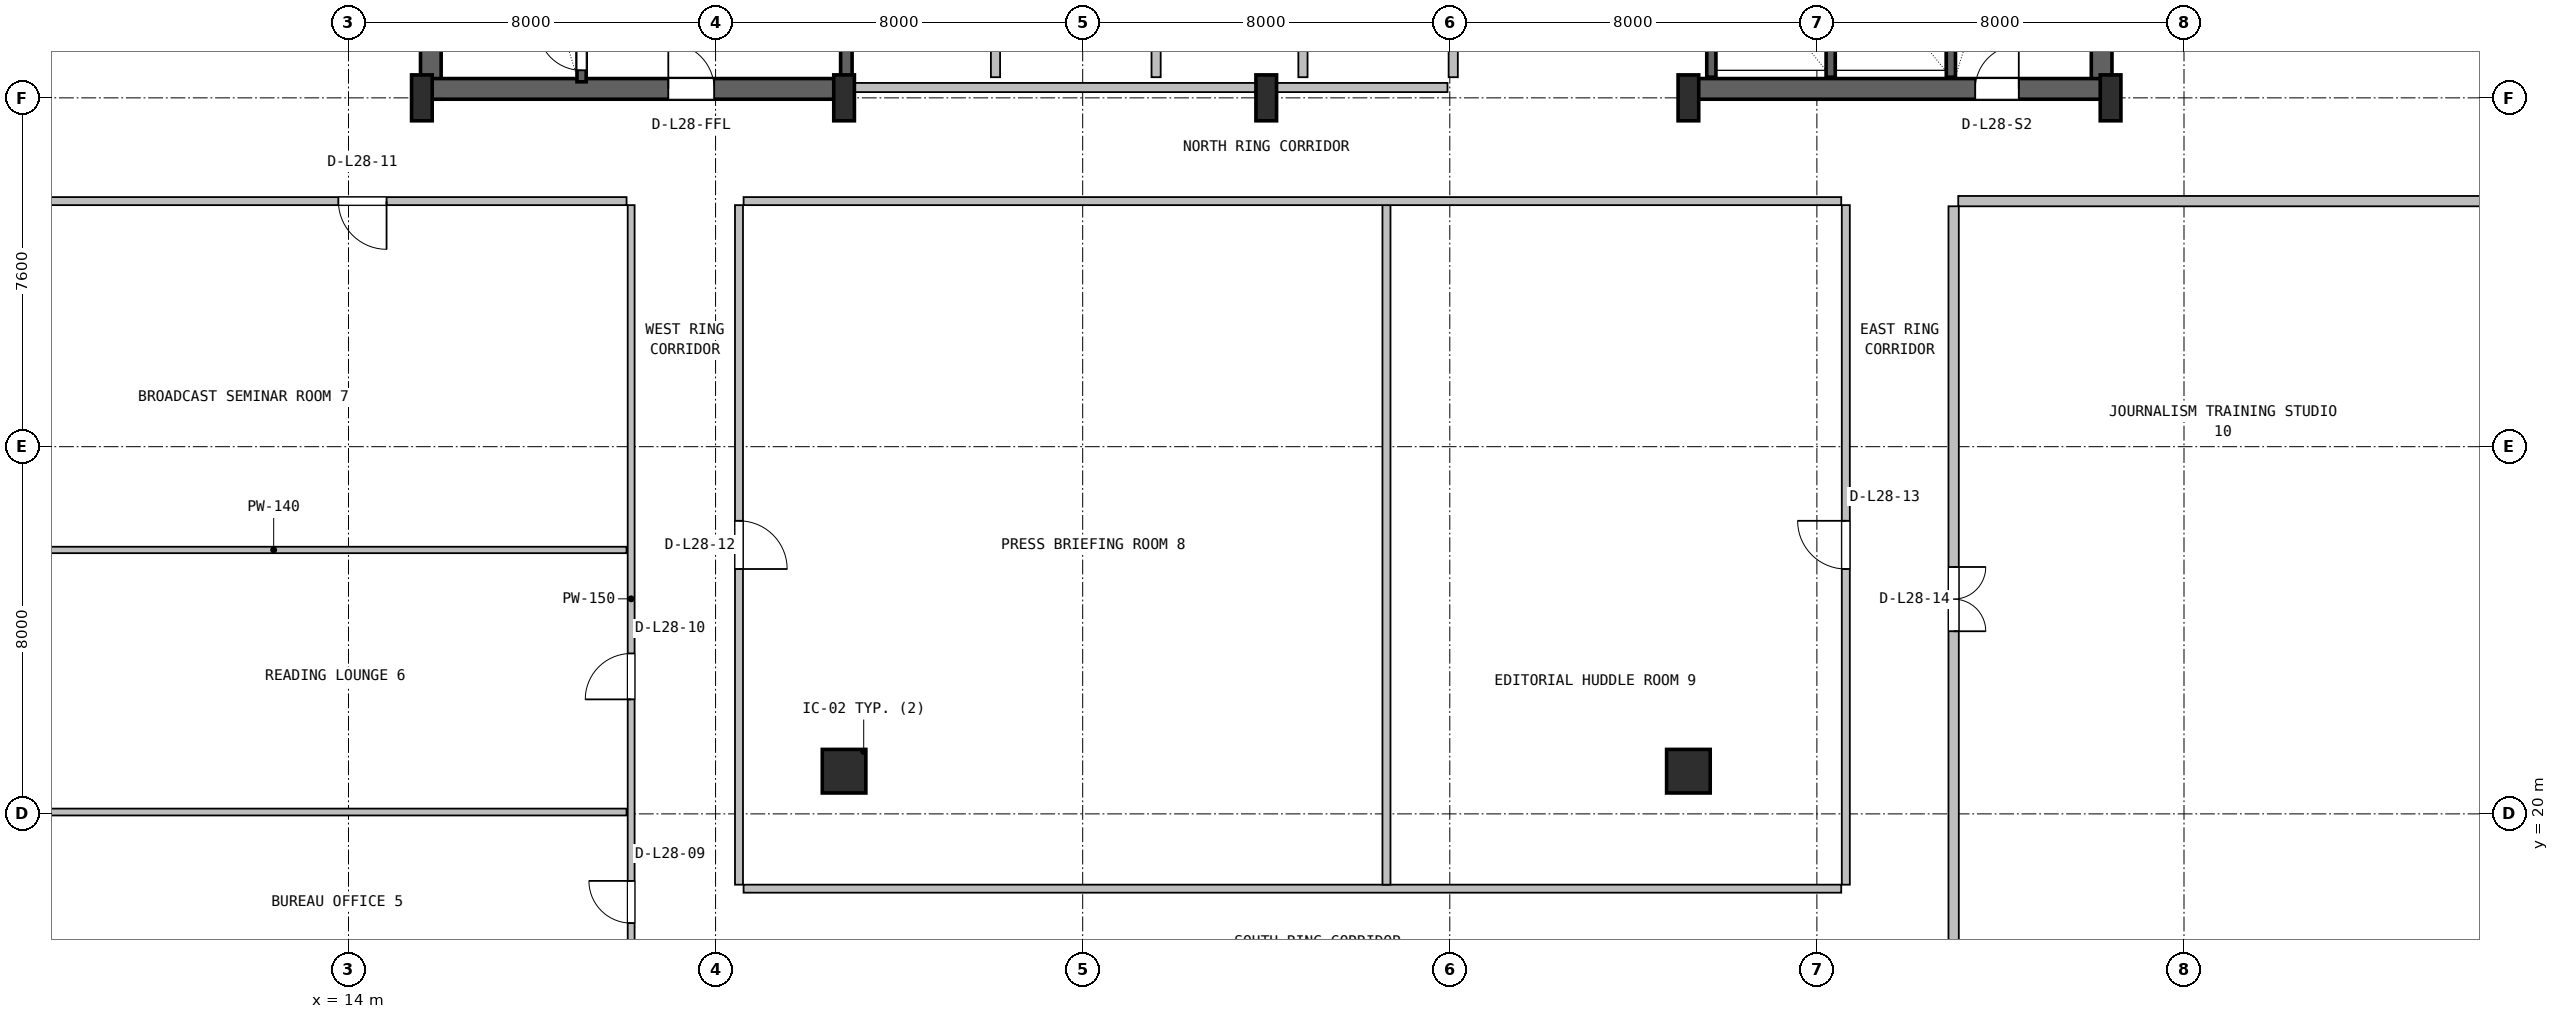
"""IFC4 building model, lengths in metres.
Left out: names, types, materials, properties, quantities, classifications, styles, units other than length and angle.
Written with IfcOpenShell. Run it as: python <this file> out.ifc"""

import sys

from ifc_helpers import new_model, si_unit, direction, frame, frame_2d, origin, origin_2d, place, context, subcontext, project, spatial, rectangle, i_section, extrude, source, transform, mapped, element, fill, save


model = new_model("IFC4")
c1 = context("Model", 3, precision=1e-05, world=origin(), true_north=direction((0.0, 1.0)))
c2 = subcontext(c1, "Body", "Model", "MODEL_VIEW")
j1 = project(units=[si_unit("LENGTHUNIT", "METRE"), si_unit("PLANEANGLEUNIT", "RADIAN")], contexts=[c1])
p1 = place(None, origin())
s1 = spatial("IfcSite", under=j1, at=p1, CompositionType="ELEMENT")
p2 = place(p1, origin())
s2 = spatial("IfcBuilding", under=s1, at=p2, CompositionType="ELEMENT")
p3 = place(p2, frame((0.0, 0.0, 118.2)))
s3 = spatial("IfcBuildingStorey", under=s2, at=p3, CompositionType="ELEMENT", Elevation=118.2)
for number, where, z_axis, x_axis in (
    (1, (15.795, 35.57, 0.0), (0.0, 0.0, 1.0), (0.0, 1.0, 0.0)),
    (2, (52.205, 35.57, 0.0), (0.0, 0.0, 1.0), (0.0, 1.0, 0.0)),
):
    element("IfcWall", number, at=place(p3, frame(where, z_axis=z_axis, x_axis=x_axis)), inside=s3, PredefinedType="SHEAR", context=c2, shape_type="SweptSolid", body=[
        extrude(rectangle(XDim=11.23, YDim=0.45, at=frame_2d((5.615, 0.0))), origin(), (0.0, 0.0, 1.0), 3.55),
    ])
p4 = place(p3, frame((15.57, 35.795, 0.0), z_axis=(0.0, 0.0, 1.0), x_axis=(1.0, 0.0, 0.0)))
e3 = element("IfcWall", 3, at=p4, inside=s3, PredefinedType="SHEAR", context=c2, shape_type="SweptSolid", body=[
    extrude(rectangle(XDim=9.23, YDim=0.45, at=frame_2d((4.615, 0.0))), origin(), (0.0, 0.0, 1.0), 3.55),
])
p5 = place(p4, frame((5.4, 0.0, 0.0)))
e4 = element("IfcOpeningElement", 4, at=p5, cuts=e3, PredefinedType="OPENING", context=c2, shape_type="SweptSolid", body=[
    extrude(rectangle(XDim=1.0, YDim=2.1, at=frame_2d((0.5, 1.05))), frame((0.0, 0.235, 0.0), z_axis=(0.0, -1.0, 0.0), x_axis=(1.0, 0.0, 0.0)), (0.0, 0.0, 1.0), 0.47),
])
p6 = place(p3, frame((43.2, 35.795, 0.0), z_axis=(0.0, 0.0, 1.0), x_axis=(1.0, 0.0, 0.0)))
e5 = element("IfcWall", 5, at=p6, inside=s3, PredefinedType="SHEAR", context=c2, shape_type="SweptSolid", body=[
    extrude(rectangle(XDim=9.23, YDim=0.45, at=frame_2d((4.615, 0.0))), origin(), (0.0, 0.0, 1.0), 3.55),
])
p7 = place(p6, frame((6.25, 0.0, 0.0)))
e6 = element("IfcOpeningElement", 6, at=p7, cuts=e5, PredefinedType="OPENING", context=c2, shape_type="SweptSolid", body=[
    extrude(rectangle(XDim=0.95, YDim=2.1, at=frame_2d((0.475, 1.05))), frame((0.0, 0.235, 0.0), z_axis=(0.0, -1.0, 0.0), x_axis=(1.0, 0.0, 0.0)), (0.0, 0.0, 1.0), 0.47),
])
m1 = source(origin(), c2, "Body", "SweptSolid", [
    extrude(i_section(OverallWidth=0.45, OverallDepth=1.0, WebThickness=0.016, FlangeThickness=0.03, FilletRadius=0.016, at=origin_2d()), origin(), (0.0, 0.0, 1.0), 3.8),
])
for number, where, z_axis, x_axis in (
    (7, (15.6, 35.6, 0.0), (0.0, 0.0, 1.0), (1.0, 0.0, 0.0)),
    (8, (24.8, 35.6, 0.0), (0.0, 0.0, 1.0), (1.0, 0.0, 0.0)),
    (9, (34.0, 35.6, 0.0), (0.0, 0.0, 1.0), (1.0, 0.0, 0.0)),
    (10, (43.2, 35.6, 0.0), (0.0, 0.0, 1.0), (1.0, 0.0, 0.0)),
    (11, (52.4, 35.6, 0.0), (0.0, 0.0, 1.0), (1.0, 0.0, 0.0)),
):
    element("IfcColumn", number, at=place(p3, frame(where, z_axis=z_axis, x_axis=x_axis)), inside=s3, PredefinedType="COLUMN", context=c2, shape_type="MappedRepresentation", body=[
        mapped(m1, transform((0.0, 0.0, 0.0), x_axis=(1.0, 0.0, 0.0), y_axis=(0.0, 1.0, 0.0), z_axis=(0.0, 0.0, 1.0), scale=1.0)),
    ])
m2 = source(origin(), c2, "Body", "SweptSolid", [
    extrude(rectangle(XDim=0.95, YDim=0.95, at=origin_2d()), origin(), (0.0, 0.0, 1.0), 3.8),
])
for number, where, z_axis, x_axis in (
    (12, (24.8, 20.93, 0.0), (0.0, 0.0, 1.0), (1.0, 0.0, 0.0)),
    (13, (43.2, 20.93, 0.0), (0.0, 0.0, 1.0), (1.0, 0.0, 0.0)),
):
    element("IfcColumn", number, at=place(p3, frame(where, z_axis=z_axis, x_axis=x_axis)), inside=s3, PredefinedType="COLUMN", context=c2, shape_type="MappedRepresentation", body=[
        mapped(m2, transform((0.0, 0.0, 0.0), x_axis=(1.0, 0.0, 0.0), y_axis=(0.0, 1.0, 0.0), z_axis=(0.0, 0.0, 1.0), scale=1.0)),
    ])
p8 = place(p3, frame((19.08, 35.95, 0.0), z_axis=(0.0, 0.0, 1.0), x_axis=(0.0, 1.0, 0.0)))
e14 = element("IfcWall", 14, at=p8, inside=s3, PredefinedType="SHEAR", context=c2, shape_type="SweptSolid", body=[
    extrude(rectangle(XDim=9.65, YDim=0.2, at=frame_2d((4.825, 0.0))), origin(), (0.0, 0.0, 1.0), 3.55),
])
p9 = place(p8, frame((0.25, 0.0, 0.0)))
e15 = element("IfcOpeningElement", 15, at=p9, cuts=e14, PredefinedType="OPENING", context=c2, shape_type="SweptSolid", body=[
    extrude(rectangle(XDim=0.95, YDim=2.1, at=frame_2d((0.475, 1.05))), frame((0.0, 0.11, 0.0), z_axis=(0.0, -1.0, 0.0), x_axis=(1.0, 0.0, 0.0)), (0.0, 0.0, 1.0), 0.22),
])
p10 = place(p3, frame((24.85, 36.05, 0.0), z_axis=(0.0, 0.0, 1.0), x_axis=(0.0, 1.0, 0.0)))
e16 = element("IfcWall", 16, at=p10, inside=s3, PredefinedType="SHEAR", context=c2, shape_type="SweptSolid", body=[
    extrude(rectangle(XDim=10.45, YDim=0.25, at=frame_2d((5.225, 0.0))), origin(), (0.0, 0.0, 1.0), 3.55),
])
p11 = place(p3, frame((48.92, 36.05, 0.0), z_axis=(0.0, 0.0, 1.0), x_axis=(0.0, 1.0, 0.0)))
e17 = element("IfcWall", 17, at=p11, inside=s3, PredefinedType="SHEAR", context=c2, shape_type="SweptSolid", body=[
    extrude(rectangle(XDim=10.5, YDim=0.2, at=frame_2d((5.25, 0.0))), origin(), (0.0, 0.0, 1.0), 3.55),
])
for number, where, z_axis, x_axis in (
    (18, (43.7, 36.05, 0.0), (0.0, 0.0, 1.0), (0.0, 1.0, 0.0)),
    (19, (46.3, 36.05, 0.0), (0.0, 0.0, 1.0), (0.0, 1.0, 0.0)),
):
    element("IfcWall", number, at=place(p3, frame(where, z_axis=z_axis, x_axis=x_axis)), inside=s3, PredefinedType="SHEAR", context=c2, shape_type="SweptSolid", body=[
        extrude(rectangle(XDim=3.05, YDim=0.2, at=frame_2d((1.525, 0.0))), origin(), (0.0, 0.0, 1.0), 3.55),
    ])
p12 = place(p3, frame((25.0, 35.825, 0.0), z_axis=(0.0, 0.0, 1.0), x_axis=(1.0, 0.0, 0.0)))
e20 = element("IfcWall", 20, at=p12, inside=s3, PredefinedType="SOLIDWALL", context=c2, shape_type="SweptSolid", body=[
    extrude(rectangle(XDim=12.95, YDim=0.2, at=frame_2d((6.475, 0.0))), origin(), (0.0, 0.0, 1.0), 2.325),
])
for number, where, z_axis, x_axis in (
    (21, (28.1, 36.05, 0.0), (0.0, 0.0, 1.0), (0.0, 1.0, 0.0)),
    (22, (31.6, 36.05, 0.0), (0.0, 0.0, 1.0), (0.0, 1.0, 0.0)),
):
    element("IfcWall", number, at=place(p3, frame(where, z_axis=z_axis, x_axis=x_axis)), inside=s3, PredefinedType="PLUMBINGWALL", context=c2, shape_type="SweptSolid", body=[
        extrude(rectangle(XDim=3.1, YDim=0.2, at=frame_2d((1.55, 0.0))), origin(), (0.0, 0.0, 1.0), 3.53),
    ])
for number, where, z_axis, x_axis in (
    (23, (34.8, 36.05, 0.0), (0.0, 0.0, 1.0), (0.0, 1.0, 0.0)),
    (24, (38.075, 36.05, 0.0), (0.0, 0.0, 1.0), (0.0, 1.0, 0.0)),
):
    element("IfcWall", number, at=place(p3, frame(where, z_axis=z_axis, x_axis=x_axis)), inside=s3, PredefinedType="SOLIDWALL", context=c2, shape_type="SweptSolid", body=[
        extrude(rectangle(XDim=3.1, YDim=0.2, at=frame_2d((1.55, 0.0))), origin(), (0.0, 0.0, 1.0), 3.53),
    ])
p13 = place(p3, frame((20.16, 16.107, 0.0), z_axis=(0.0, 0.0, 1.0), x_axis=(0.0, 1.0, 0.0)))
e25 = element("IfcWall", 25, at=p13, inside=s3, PredefinedType="PARTITIONING", context=c2, shape_type="SweptSolid", body=[
    extrude(rectangle(XDim=17.156, YDim=0.15, at=frame_2d((8.578, 0.0))), origin(), (0.0, 0.0, 1.0), 3.222),
])
p14 = place(p13, frame((1.513, 0.0, 0.0)))
e26 = element("IfcOpeningElement", 26, at=p14, cuts=e25, PredefinedType="OPENING", context=c2, shape_type="SweptSolid", body=[
    extrude(rectangle(XDim=0.92, YDim=2.08, at=frame_2d((0.46, 1.04))), frame((0.0, 0.085, 0.0), z_axis=(0.0, -1.0, 0.0), x_axis=(1.0, 0.0, 0.0)), (0.0, 0.0, 1.0), 0.17),
])
p15 = place(p13, frame((6.388, 0.0, 0.0)))
e27 = element("IfcOpeningElement", 27, at=p15, cuts=e25, PredefinedType="OPENING", context=c2, shape_type="SweptSolid", body=[
    extrude(rectangle(XDim=1.0, YDim=2.1, at=frame_2d((0.5, 1.05))), frame((0.0, 0.085, 0.0), z_axis=(0.0, -1.0, 0.0), x_axis=(1.0, 0.0, 0.0)), (0.0, 0.0, 1.0), 0.17),
])
p16 = place(p3, frame((4.68, 20.04, 0.0), z_axis=(0.0, 0.0, 1.0), x_axis=(1.0, 0.0, 0.0)))
e28 = element("IfcWall", 28, at=p16, inside=s3, PredefinedType="PARTITIONING", context=c2, shape_type="SweptSolid", body=[
    extrude(rectangle(XDim=15.38, YDim=0.15, at=frame_2d((7.69, 0.0))), origin(), (0.0, 0.0, 1.0), 3.108),
])
p17 = place(p3, frame((4.68, 25.75, 0.0), z_axis=(0.0, 0.0, 1.0), x_axis=(1.0, 0.0, 0.0)))
e29 = element("IfcWall", 29, at=p17, inside=s3, PredefinedType="PARTITIONING", context=c2, shape_type="SweptSolid", body=[
    extrude(rectangle(XDim=15.38, YDim=0.14, at=frame_2d((7.69, 0.0))), origin(), (0.0, 0.0, 1.0), 3.108),
])
p18 = place(p3, frame((4.68, 33.35, 0.0), z_axis=(0.0, 0.0, 1.0), x_axis=(1.0, 0.0, 0.0)))
e30 = element("IfcWall", 30, at=p18, inside=s3, PredefinedType="PARTITIONING", context=c2, shape_type="SweptSolid", body=[
    extrude(rectangle(XDim=15.38, YDim=0.175, at=frame_2d((7.69, 0.0))), origin(), (0.0, 0.0, 1.0), 3.108),
])
p19 = place(p18, frame((9.1, 0.0, 0.0)))
e31 = element("IfcOpeningElement", 31, at=p19, cuts=e30, PredefinedType="OPENING", context=c2, shape_type="SweptSolid", body=[
    extrude(rectangle(XDim=1.05, YDim=2.1, at=frame_2d((0.525, 1.05))), frame((0.0, 0.098, 0.0), z_axis=(0.0, -1.0, 0.0), x_axis=(1.0, 0.0, 0.0)), (0.0, 0.0, 1.0), 0.195),
])
p20 = place(p3, frame((22.61, 18.37, 0.0), z_axis=(0.0, 0.0, 1.0), x_axis=(1.0, 0.0, 0.0)))
e32 = element("IfcWall", 32, at=p20, inside=s3, PredefinedType="PARTITIONING", context=c2, shape_type="SweptSolid", body=[
    extrude(rectangle(XDim=23.92, YDim=0.175, at=frame_2d((11.96, 0.0))), origin(), (0.0, 0.0, 1.0), 2.83),
])
p21 = place(p3, frame((36.62, 18.457, 0.0), z_axis=(0.0, 0.0, 1.0), x_axis=(0.0, 1.0, 0.0)))
e33 = element("IfcWall", 33, at=p21, inside=s3, PredefinedType="PARTITIONING", context=c2, shape_type="SweptSolid", body=[
    extrude(rectangle(XDim=14.806, YDim=0.175, at=frame_2d((7.403, 0.0))), origin(), (0.0, 0.0, 1.0), 2.83),
])
p22 = place(p3, frame((22.61, 33.35, 0.0), z_axis=(0.0, 0.0, 1.0), x_axis=(1.0, 0.0, 0.0)))
e34 = element("IfcWall", 34, at=p22, inside=s3, PredefinedType="PARTITIONING", context=c2, shape_type="SweptSolid", body=[
    extrude(rectangle(XDim=23.92, YDim=0.175, at=frame_2d((11.96, 0.0))), origin(), (0.0, 0.0, 1.0), 2.83),
])
p23 = place(p3, frame((22.51, 18.457, 0.0), z_axis=(0.0, 0.0, 1.0), x_axis=(0.0, 1.0, 0.0)))
e35 = element("IfcWall", 35, at=p23, inside=s3, PredefinedType="PARTITIONING", context=c2, shape_type="SweptSolid", body=[
    extrude(rectangle(XDim=14.806, YDim=0.175, at=frame_2d((7.403, 0.0))), origin(), (0.0, 0.0, 1.0), 3.222),
])
p24 = place(p23, frame((6.878, 0.0, 0.0)))
e36 = element("IfcOpeningElement", 36, at=p24, cuts=e35, PredefinedType="OPENING", context=c2, shape_type="SweptSolid", body=[
    extrude(rectangle(XDim=1.05, YDim=2.1, at=frame_2d((0.525, 1.05))), frame((0.0, 0.098, 0.0), z_axis=(0.0, -1.0, 0.0), x_axis=(1.0, 0.0, 0.0)), (0.0, 0.0, 1.0), 0.195),
])
p25 = place(p3, frame((46.63, 18.457, 0.0), z_axis=(0.0, 0.0, 1.0), x_axis=(0.0, 1.0, 0.0)))
e37 = element("IfcWall", 37, at=p25, inside=s3, PredefinedType="PARTITIONING", context=c2, shape_type="SweptSolid", body=[
    extrude(rectangle(XDim=14.806, YDim=0.175, at=frame_2d((7.403, 0.0))), origin(), (0.0, 0.0, 1.0), 3.222),
])
p26 = place(p25, frame((6.878, 0.0, 0.0)))
e38 = element("IfcOpeningElement", 38, at=p26, cuts=e37, PredefinedType="OPENING", context=c2, shape_type="SweptSolid", body=[
    extrude(rectangle(XDim=1.05, YDim=2.1, at=frame_2d((0.525, 1.05))), frame((0.0, 0.098, 0.0), z_axis=(0.0, -1.0, 0.0), x_axis=(1.0, 0.0, 0.0)), (0.0, 0.0, 1.0), 0.195),
])
p27 = place(p3, frame((49.08, 33.35, 0.0), z_axis=(0.0, 0.0, 1.0), x_axis=(1.0, 0.0, 0.0)))
e39 = element("IfcWall", 39, at=p27, inside=s3, PredefinedType="PARTITIONING", context=c2, shape_type="SweptSolid", body=[
    extrude(rectangle(XDim=14.24, YDim=0.225, at=frame_2d((7.12, 0.0))), origin(), (0.0, 0.0, 1.0), 3.108),
])
p28 = place(p3, frame((48.98, 16.107, 0.0), z_axis=(0.0, 0.0, 1.0), x_axis=(0.0, 1.0, 0.0)))
e40 = element("IfcWall", 40, at=p28, inside=s3, PredefinedType="PARTITIONING", context=c2, shape_type="SweptSolid", body=[
    extrude(rectangle(XDim=17.131, YDim=0.225, at=frame_2d((8.565, 0.0))), origin(), (0.0, 0.0, 1.0), 3.222),
])
p29 = place(p28, frame((7.872, 0.0, 0.0)))
e41 = element("IfcOpeningElement", 41, at=p29, cuts=e40, PredefinedType="OPENING", context=c2, shape_type="SweptSolid", body=[
    extrude(rectangle(XDim=1.4, YDim=2.12, at=frame_2d((0.7, 1.06))), frame((0.0, 0.123, 0.0), z_axis=(0.0, -1.0, 0.0), x_axis=(1.0, 0.0, 0.0)), (0.0, 0.0, 1.0), 0.245),
])
m3 = source(origin(), c2, "Body", "SweptSolid", [
    extrude(rectangle(XDim=0.95, YDim=2.1, at=frame_2d((0.475, 1.05))), frame((0.0, 0.025, 0.0), z_axis=(0.0, -1.0, 0.0), x_axis=(1.0, 0.0, 0.0)), (0.0, 0.0, 1.0), 0.05),
])
p30 = place(p9, origin())
e42 = element("IfcDoor", 42, at=p30, inside=s3, OperationType="SINGLE_SWING_RIGHT", PredefinedType="DOOR", context=c2, shape_type="MappedRepresentation", body=[
    mapped(m3, transform((0.0, 0.0, 0.0), x_axis=(1.0, 0.0, 0.0), y_axis=(0.0, 1.0, 0.0), z_axis=(0.0, 0.0, 1.0), scale=1.0)),
])
fill(e15, e42)
m4 = source(origin(), c2, "Body", "SweptSolid", [
    extrude(rectangle(XDim=1.0, YDim=2.1, at=frame_2d((0.5, 1.05))), frame((0.0, 0.025, 0.0), z_axis=(0.0, -1.0, 0.0), x_axis=(1.0, 0.0, 0.0)), (0.0, 0.0, 1.0), 0.05),
])
p31 = place(p5, origin())
e43 = element("IfcDoor", 43, at=p31, inside=s3, OperationType="SINGLE_SWING_LEFT", PredefinedType="DOOR", context=c2, shape_type="MappedRepresentation", body=[
    mapped(m4, transform((0.0, 0.0, 0.0), x_axis=(1.0, 0.0, 0.0), y_axis=(0.0, 1.0, 0.0), z_axis=(0.0, 0.0, 1.0), scale=1.0)),
])
fill(e4, e43)
p32 = place(p7, origin())
e44 = element("IfcDoor", 44, at=p32, inside=s3, OperationType="SINGLE_SWING_RIGHT", PredefinedType="DOOR", context=c2, shape_type="MappedRepresentation", body=[
    mapped(m3, transform((0.0, 0.0, 0.0), x_axis=(1.0, 0.0, 0.0), y_axis=(0.0, 1.0, 0.0), z_axis=(0.0, 0.0, 1.0), scale=1.0)),
])
fill(e6, e44)
m5 = source(origin(), c2, "Body", "SweptSolid", [
    extrude(rectangle(XDim=0.92, YDim=2.08, at=frame_2d((0.46, 1.04))), frame((0.0, 0.025, 0.0), z_axis=(0.0, -1.0, 0.0), x_axis=(1.0, 0.0, 0.0)), (0.0, 0.0, 1.0), 0.05),
])
p33 = place(p14, origin())
e45 = element("IfcDoor", 45, at=p33, inside=s3, OperationType="SINGLE_SWING_RIGHT", PredefinedType="DOOR", context=c2, shape_type="MappedRepresentation", body=[
    mapped(m5, transform((0.0, 0.0, 0.0), x_axis=(1.0, 0.0, 0.0), y_axis=(0.0, 1.0, 0.0), z_axis=(0.0, 0.0, 1.0), scale=1.0)),
])
fill(e26, e45)
m6 = source(origin(), c2, "Body", "SweptSolid", [
    extrude(rectangle(XDim=1.0, YDim=2.1, at=frame_2d((0.5, 1.05))), frame((0.0, 0.025, 0.0), z_axis=(0.0, -1.0, 0.0), x_axis=(1.0, 0.0, 0.0)), (0.0, 0.0, 1.0), 0.05),
])
p34 = place(p15, origin())
e46 = element("IfcDoor", 46, at=p34, inside=s3, OperationType="SINGLE_SWING_LEFT", PredefinedType="DOOR", context=c2, shape_type="MappedRepresentation", body=[
    mapped(m6, transform((0.0, 0.0, 0.0), x_axis=(1.0, 0.0, 0.0), y_axis=(0.0, 1.0, 0.0), z_axis=(0.0, 0.0, 1.0), scale=1.0)),
])
fill(e27, e46)
m7 = source(origin(), c2, "Body", "SweptSolid", [
    extrude(rectangle(XDim=1.05, YDim=2.1, at=frame_2d((0.525, 1.05))), frame((0.0, 0.025, 0.0), z_axis=(0.0, -1.0, 0.0), x_axis=(1.0, 0.0, 0.0)), (0.0, 0.0, 1.0), 0.05),
])
p35 = place(p19, frame((1.05, 0.0, 0.0), z_axis=(0.0, 0.0, 1.0), x_axis=(-1.0, 0.0, 0.0)))
e47 = element("IfcDoor", 47, at=p35, inside=s3, OperationType="SINGLE_SWING_RIGHT", PredefinedType="DOOR", context=c2, shape_type="MappedRepresentation", body=[
    mapped(m7, transform((0.0, 0.0, 0.0), x_axis=(1.0, 0.0, 0.0), y_axis=(0.0, 1.0, 0.0), z_axis=(0.0, 0.0, 1.0), scale=1.0)),
])
fill(e31, e47)
p36 = place(p24, frame((1.05, 0.0, 0.0), z_axis=(0.0, 0.0, 1.0), x_axis=(-1.0, 0.0, 0.0)))
e48 = element("IfcDoor", 48, at=p36, inside=s3, OperationType="SINGLE_SWING_LEFT", PredefinedType="DOOR", context=c2, shape_type="MappedRepresentation", body=[
    mapped(m7, transform((0.0, 0.0, 0.0), x_axis=(1.0, 0.0, 0.0), y_axis=(0.0, 1.0, 0.0), z_axis=(0.0, 0.0, 1.0), scale=1.0)),
])
fill(e36, e48)
p37 = place(p26, origin())
e49 = element("IfcDoor", 49, at=p37, inside=s3, OperationType="SINGLE_SWING_RIGHT", PredefinedType="DOOR", context=c2, shape_type="MappedRepresentation", body=[
    mapped(m7, transform((0.0, 0.0, 0.0), x_axis=(1.0, 0.0, 0.0), y_axis=(0.0, 1.0, 0.0), z_axis=(0.0, 0.0, 1.0), scale=1.0)),
])
fill(e38, e49)
m8 = source(origin(), c2, "Body", "SweptSolid", [
    extrude(rectangle(XDim=1.4, YDim=2.12, at=frame_2d((0.7, 1.06))), frame((0.0, 0.025, 0.0), z_axis=(0.0, -1.0, 0.0), x_axis=(1.0, 0.0, 0.0)), (0.0, 0.0, 1.0), 0.05),
])
p38 = place(p29, frame((1.4, 0.0, 0.0), z_axis=(0.0, 0.0, 1.0), x_axis=(-1.0, 0.0, 0.0)))
e50 = element("IfcDoor", 50, at=p38, inside=s3, OperationType="DOUBLE_DOOR_SINGLE_SWING", PredefinedType="DOOR", context=c2, shape_type="MappedRepresentation", body=[
    mapped(m8, transform((0.0, 0.0, 0.0), x_axis=(1.0, 0.0, 0.0), y_axis=(0.0, 1.0, 0.0), z_axis=(0.0, 0.0, 1.0), scale=1.0)),
])
fill(e41, e50)
save(model, sys.argv[1])
